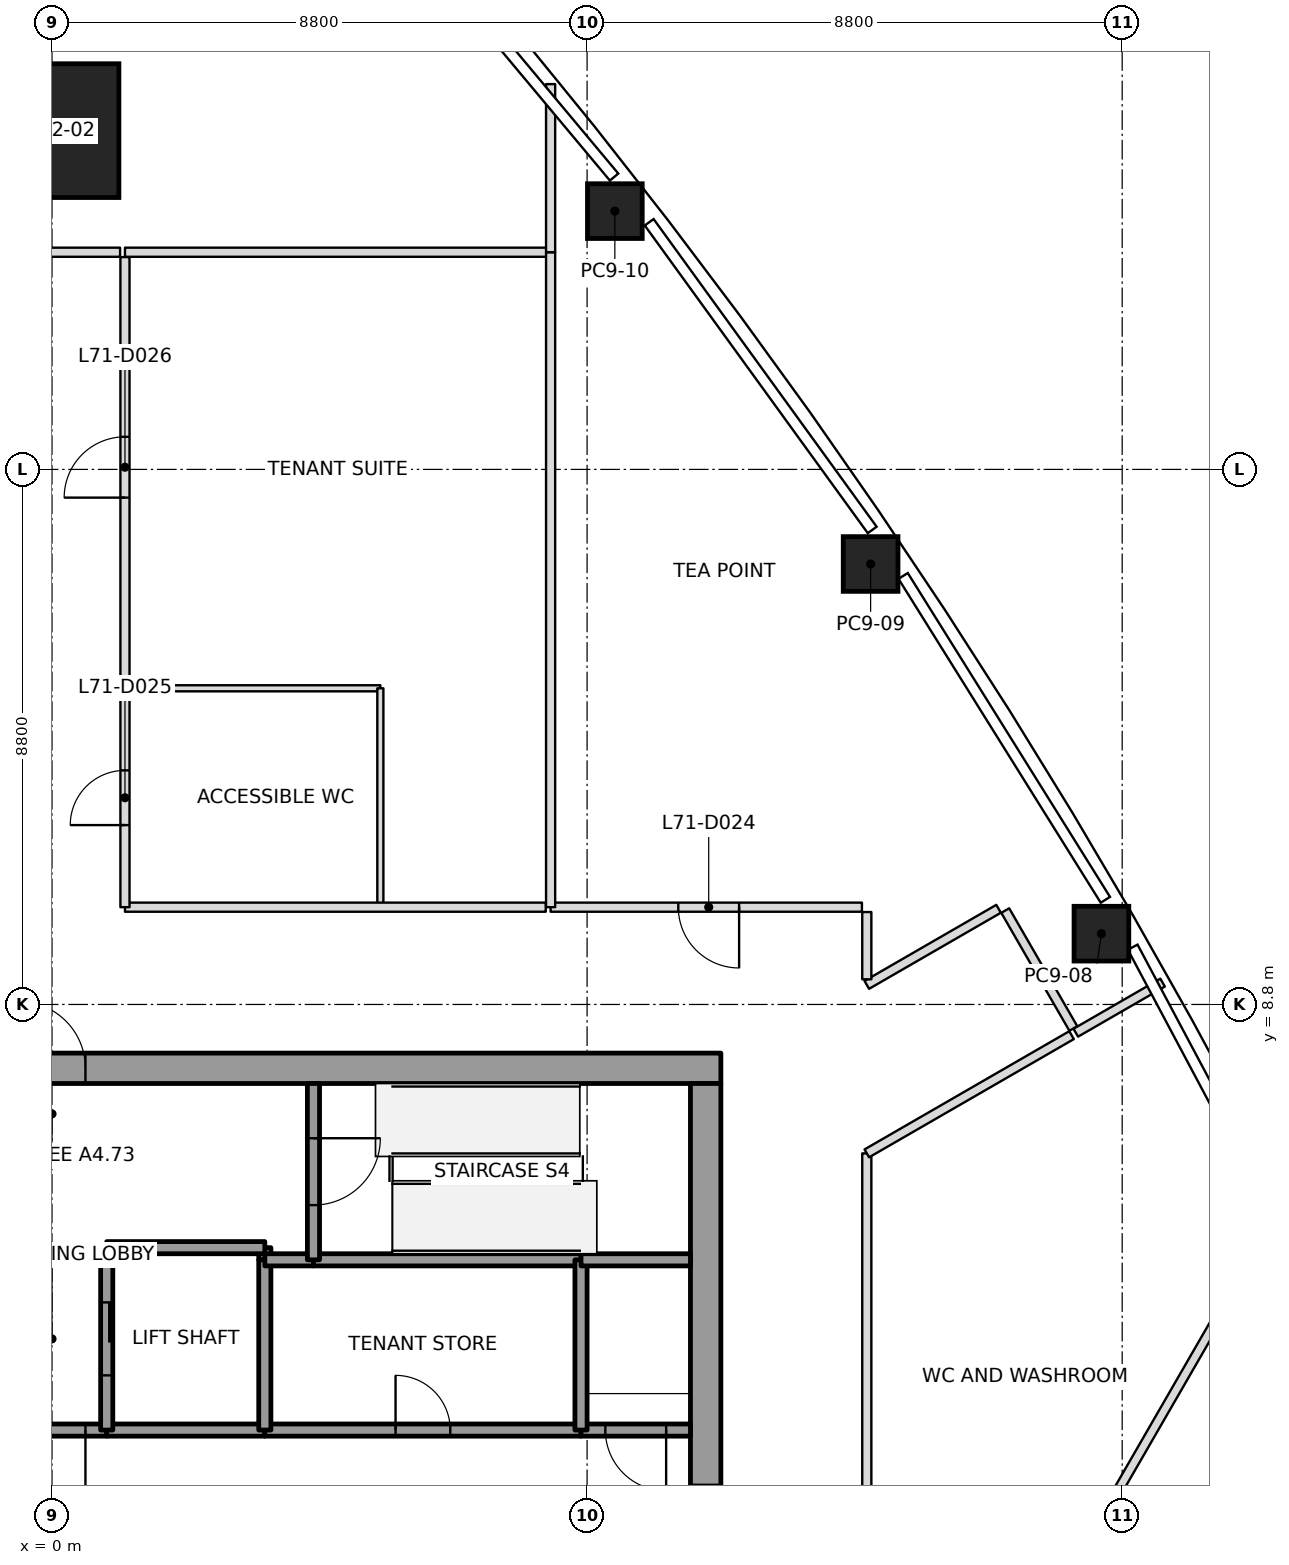
"""IFC4 building model, lengths in metres.
Left out: names, types, materials, properties, quantities, classifications, styles, units other than length and angle.
Written with IfcOpenShell. Run it as: python <this file> out.ifc"""

import sys

from ifc_helpers import new_model, si_unit, direction, frame, frame_2d, origin, origin_2d, place, context, subcontext, project, spatial, rectangle, extrude, element, fill, save


model = new_model("IFC4")
c1 = context("Model", 3, precision=1e-05, world=origin(), true_north=direction((0.0, 1.0)))
c2 = subcontext(c1, "Body", "Model", "MODEL_VIEW")
j1 = project(units=[si_unit("LENGTHUNIT", "METRE"), si_unit("PLANEANGLEUNIT", "RADIAN")], contexts=[c1])
p1 = place(None, origin())
s1 = spatial("IfcSite", under=j1, at=p1, CompositionType="ELEMENT")
p2 = place(p1, origin())
s2 = spatial("IfcBuilding", under=s1, at=p2, CompositionType="ELEMENT")
p3 = place(p2, frame((0.0, 0.0, 311.0)))
s3 = spatial("IfcBuildingStorey", under=s2, at=p3, CompositionType="ELEMENT", Elevation=311.0)
p4 = place(p3, frame((0.0, 23.172, 0.0), z_axis=(0.0, -0.031966077398, 0.999488954364), x_axis=(1.0, 0.0, 0.0)))
e1 = element("IfcColumn", 1, at=p4, inside=s3, PredefinedType="COLUMN", context=c2, shape_type="SweptSolid", body=[
    extrude(rectangle(XDim=2.2, YDim=2.2, at=origin_2d()), origin(), (0.0, 0.0, 1.0), 4.002),
])
p5 = place(p3, frame((17.259, 9.964, 0.0), z_axis=(-0.009887049298, -0.00573692984, 0.999934664812), x_axis=(-0.499975560967, 0.866039512843, 2.5126546e-05)))
e2 = element("IfcColumn", 2, at=p5, inside=s3, PredefinedType="COLUMN", context=c2, shape_type="SweptSolid", body=[
    extrude(rectangle(XDim=0.9, YDim=0.9, at=origin_2d()), origin(), (0.0, 0.0, 1.0), 4.0),
])
p6 = place(p3, frame((13.463, 16.044, 0.0), z_axis=(-0.00530952661, -0.013121243922, 0.999899815924), x_axis=(-0.558539524226, 0.829440110709, 0.007918498852)))
e3 = element("IfcColumn", 3, at=p6, inside=s3, PredefinedType="COLUMN", context=c2, shape_type="SweptSolid", body=[
    extrude(rectangle(XDim=0.9, YDim=0.9, at=origin_2d()), origin(), (0.0, 0.0, 1.0), 4.0),
])
p7 = place(p3, frame((9.256, 21.848, 0.0), z_axis=(-0.000244090509, -0.020259512254, 0.999794725223), x_axis=(-0.614435286735, 0.788808315302, 0.015834144259)))
e4 = element("IfcColumn", 4, at=p7, inside=s3, PredefinedType="COLUMN", context=c2, shape_type="SweptSolid", body=[
    extrude(rectangle(XDim=0.9, YDim=0.9, at=origin_2d()), origin(), (0.0, 0.0, 1.0), 4.001),
])
p8 = place(p3, frame((-11.0, 7.75, 0.0), z_axis=(0.0, 0.0, 1.0), x_axis=(1.0, 0.0, 0.0)))
e5 = element("IfcWall", 5, at=p8, inside=s3, PredefinedType="SHEAR", context=c2, shape_type="SweptSolid", body=[
    extrude(rectangle(XDim=22.0, YDim=0.5, at=frame_2d((11.0, 0.0))), origin(), (0.0, 0.0, 1.0), 4.0),
])
p9 = place(p8, frame((10.45, 0.0, 0.0)))
e6 = element("IfcOpeningElement", 6, at=p9, cuts=e5, PredefinedType="OPENING", context=c2, shape_type="SweptSolid", body=[
    extrude(rectangle(XDim=1.1, YDim=2.1, at=frame_2d((0.55, 1.05))), frame((0.0, 0.25, 0.0), z_axis=(0.0, -1.0, 0.0), x_axis=(1.0, 0.0, 0.0)), (0.0, 0.0, 1.0), 0.5),
])
p10 = place(p3, frame((10.75, -7.5, 0.0), z_axis=(0.0, 0.0, 1.0), x_axis=(0.0, 1.0, 0.0)))
e7 = element("IfcWall", 7, at=p10, inside=s3, PredefinedType="SHEAR", context=c2, shape_type="SweptSolid", body=[
    extrude(rectangle(XDim=15.0, YDim=0.5, at=frame_2d((7.5, 0.0))), origin(), (0.0, 0.0, 1.0), 4.0),
])
p11 = place(p10, frame((6.6, 0.0, 0.0)))
e8 = element("IfcOpeningElement", 8, at=p11, cuts=e7, PredefinedType="OPENING", context=c2, shape_type="SweptSolid", body=[
    extrude(rectangle(XDim=1.8, YDim=2.1, at=frame_2d((0.9, 1.05))), frame((0.0, 0.25, 0.0), z_axis=(0.0, -1.0, 0.0), x_axis=(1.0, 0.0, 0.0)), (0.0, 0.0, 1.0), 0.5),
])
p12 = place(p3, frame((0.9, 1.8, 0.0), z_axis=(0.0, 0.0, 1.0), x_axis=(-1.0, 0.0, 0.0)))
e9 = element("IfcWall", 9, at=p12, inside=s3, PredefinedType="SOLIDWALL", context=c2, shape_type="SweptSolid", body=[
    extrude(rectangle(XDim=1.8, YDim=0.2, at=frame_2d((0.9, 0.0))), origin(), (0.0, 0.0, 1.0), 3.85),
])
p13 = place(p12, frame((0.35, 0.0, 0.0)))
e10 = element("IfcOpeningElement", 10, at=p13, cuts=e9, PredefinedType="OPENING", context=c2, shape_type="SweptSolid", body=[
    extrude(rectangle(XDim=1.1, YDim=2.1, at=frame_2d((0.55, 1.05))), frame((0.0, 0.1, 0.0), z_axis=(0.0, -1.0, 0.0), x_axis=(1.0, 0.0, 0.0)), (0.0, 0.0, 1.0), 0.2),
])
p14 = place(p3, frame((3.5, 1.8, 0.0), z_axis=(0.0, 0.0, 1.0), x_axis=(-1.0, 0.0, 0.0)))
e11 = element("IfcWall", 11, at=p14, inside=s3, PredefinedType="SOLIDWALL", context=c2, shape_type="SweptSolid", body=[
    extrude(rectangle(XDim=2.6, YDim=0.2, at=frame_2d((1.3, 0.0))), origin(), (0.0, 0.0, 1.0), 3.85),
])
p15 = place(p3, frame((3.5, 4.6, 0.0), z_axis=(0.0, 0.0, 1.0), x_axis=(0.0, 1.0, 0.0)))
e12 = element("IfcWall", 12, at=p15, inside=s3, PredefinedType="SOLIDWALL", context=c2, shape_type="SweptSolid", body=[
    extrude(rectangle(XDim=0.2, YDim=0.2, at=frame_2d((0.1, 0.0))), origin(), (0.0, 0.0, 1.0), 3.85),
])
p16 = place(p3, frame((3.5, 4.8, 0.0), z_axis=(0.0, 0.0, 1.0), x_axis=(-1.0, 0.0, 0.0)))
e13 = element("IfcWall", 13, at=p16, inside=s3, PredefinedType="SOLIDWALL", context=c2, shape_type="SweptSolid", body=[
    extrude(rectangle(XDim=2.6, YDim=0.2, at=frame_2d((1.3, 0.0))), origin(), (0.0, 0.0, 1.0), 3.85),
])
p17 = place(p3, frame((0.9, 4.8, 0.0), z_axis=(0.0, 0.0, 1.0), x_axis=(0.0, -1.0, 0.0)))
e14 = element("IfcWall", 14, at=p17, inside=s3, PredefinedType="SOLIDWALL", context=c2, shape_type="SweptSolid", body=[
    extrude(rectangle(XDim=3.0, YDim=0.2, at=frame_2d((1.5, 0.0))), origin(), (0.0, 0.0, 1.0), 3.85),
])
p18 = place(p17, frame((0.9, 0.0, 0.0)))
e15 = element("IfcOpeningElement", 15, at=p18, cuts=e14, PredefinedType="OPENING", context=c2, shape_type="SweptSolid", body=[
    extrude(rectangle(XDim=1.2, YDim=2.1, at=frame_2d((0.6, 1.05))), frame((0.0, 0.1, 0.0), z_axis=(0.0, -1.0, 0.0), x_axis=(1.0, 0.0, 0.0)), (0.0, 0.0, 1.0), 0.2),
])
p19 = place(p3, frame((3.5, 1.8, 0.0), z_axis=(0.0, 0.0, 1.0), x_axis=(1.0, 0.0, 0.0)))
e16 = element("IfcWall", 16, at=p19, inside=s3, PredefinedType="SOLIDWALL", context=c2, shape_type="SweptSolid", body=[
    extrude(rectangle(XDim=5.2, YDim=0.2, at=frame_2d((2.6, 0.0))), origin(), (0.0, 0.0, 1.0), 3.85),
])
p20 = place(p19, frame((2.15, 0.0, 0.0)))
e17 = element("IfcOpeningElement", 17, at=p20, cuts=e16, PredefinedType="OPENING", context=c2, shape_type="SweptSolid", body=[
    extrude(rectangle(XDim=0.9, YDim=2.1, at=frame_2d((0.45, 1.05))), frame((0.0, 0.1, 0.0), z_axis=(0.0, -1.0, 0.0), x_axis=(1.0, 0.0, 0.0)), (0.0, 0.0, 1.0), 0.2),
])
p21 = place(p3, frame((3.5, 4.6, 0.0), z_axis=(0.0, 0.0, 1.0), x_axis=(0.0, -1.0, 0.0)))
e18 = element("IfcWall", 18, at=p21, inside=s3, PredefinedType="SOLIDWALL", context=c2, shape_type="SweptSolid", body=[
    extrude(rectangle(XDim=2.8, YDim=0.2, at=frame_2d((1.4, 0.0))), origin(), (0.0, 0.0, 1.0), 3.85),
])
p22 = place(p3, frame((4.3, 4.6, 0.0), z_axis=(0.0, 0.0, 1.0), x_axis=(-1.0, 0.0, 0.0)))
e19 = element("IfcWall", 19, at=p22, inside=s3, PredefinedType="SOLIDWALL", context=c2, shape_type="SweptSolid", body=[
    extrude(rectangle(XDim=0.8, YDim=0.2, at=frame_2d((0.4, 0.0))), origin(), (0.0, 0.0, 1.0), 3.85),
])
p23 = place(p3, frame((8.7, 4.6, 0.0), z_axis=(0.0, 0.0, 1.0), x_axis=(-1.0, 0.0, 0.0)))
e20 = element("IfcWall", 20, at=p23, inside=s3, PredefinedType="SOLIDWALL", context=c2, shape_type="SweptSolid", body=[
    extrude(rectangle(XDim=4.4, YDim=0.2, at=frame_2d((2.2, 0.0))), origin(), (0.0, 0.0, 1.0), 3.85),
])
p24 = place(p3, frame((4.3, 7.5, 0.0), z_axis=(0.0, 0.0, 1.0), x_axis=(0.0, -1.0, 0.0)))
e21 = element("IfcWall", 21, at=p24, inside=s3, PredefinedType="SOLIDWALL", context=c2, shape_type="SweptSolid", body=[
    extrude(rectangle(XDim=2.9, YDim=0.2, at=frame_2d((1.45, 0.0))), origin(), (0.0, 0.0, 1.0), 3.85),
])
p25 = place(p24, frame((0.9, 0.0, 0.0)))
e22 = element("IfcOpeningElement", 22, at=p25, cuts=e21, PredefinedType="OPENING", context=c2, shape_type="SweptSolid", body=[
    extrude(rectangle(XDim=1.1, YDim=2.1, at=frame_2d((0.55, 1.05))), frame((0.0, 0.1, 0.0), z_axis=(0.0, -1.0, 0.0), x_axis=(1.0, 0.0, 0.0)), (0.0, 0.0, 1.0), 0.2),
])
p26 = place(p3, frame((10.5, 1.8, 0.0), z_axis=(0.0, 0.0, 1.0), x_axis=(-1.0, 0.0, 0.0)))
e23 = element("IfcWall", 23, at=p26, inside=s3, PredefinedType="SOLIDWALL", context=c2, shape_type="SweptSolid", body=[
    extrude(rectangle(XDim=1.8, YDim=0.2, at=frame_2d((0.9, 0.0))), origin(), (0.0, 0.0, 1.0), 3.85),
])
p27 = place(p26, frame((0.4, 0.0, 0.0)))
e24 = element("IfcOpeningElement", 24, at=p27, cuts=e23, PredefinedType="OPENING", context=c2, shape_type="SweptSolid", body=[
    extrude(rectangle(XDim=1.0, YDim=2.1, at=frame_2d((0.5, 1.05))), frame((0.0, 0.1, 0.0), z_axis=(0.0, -1.0, 0.0), x_axis=(1.0, 0.0, 0.0)), (0.0, 0.0, 1.0), 0.2),
])
p28 = place(p3, frame((8.7, 1.8, 0.0), z_axis=(0.0, 0.0, 1.0), x_axis=(0.0, 1.0, 0.0)))
e25 = element("IfcWall", 25, at=p28, inside=s3, PredefinedType="SOLIDWALL", context=c2, shape_type="SweptSolid", body=[
    extrude(rectangle(XDim=2.8, YDim=0.2, at=frame_2d((1.4, 0.0))), origin(), (0.0, 0.0, 1.0), 3.85),
])
p29 = place(p3, frame((10.5, 4.6, 0.0), z_axis=(0.0, 0.0, 1.0), x_axis=(-1.0, 0.0, 0.0)))
e26 = element("IfcWall", 26, at=p29, inside=s3, PredefinedType="SOLIDWALL", context=c2, shape_type="SweptSolid", body=[
    extrude(rectangle(XDim=1.8, YDim=0.2, at=frame_2d((0.9, 0.0))), origin(), (0.0, 0.0, 1.0), 3.85),
])
p30 = place(p3, frame((1.2, 21.172, 0.0), z_axis=(0.0, 0.0, 1.0), x_axis=(1.0, 0.0, 0.0)))
e27 = element("IfcWall", 27, at=p30, inside=s3, PredefinedType="PARTITIONING", context=c2, shape_type="SweptSolid", body=[
    extrude(rectangle(XDim=7.0, YDim=0.15, at=frame_2d((3.5, 0.0))), origin(), (0.0, 0.0, 1.0), 3.443),
])
p31 = place(p3, frame((8.2, 10.4, 0.0), z_axis=(0.0, 0.0, 1.0), x_axis=(0.0, 1.0, 0.0)))
e28 = element("IfcWall", 28, at=p31, inside=s3, PredefinedType="PARTITIONING", context=c2, shape_type="SweptSolid", body=[
    extrude(rectangle(XDim=10.772, YDim=0.15, at=frame_2d((5.386, 0.0))), origin(), (0.0, 0.0, 1.0), 3.317),
])
p32 = place(p3, frame((8.2, 21.172, 0.0), z_axis=(0.0, 0.0, 1.0), x_axis=(0.0, 1.0, 0.0)))
e29 = element("IfcWall", 29, at=p32, inside=s3, PredefinedType="PARTITIONING", context=c2, shape_type="SweptSolid", body=[
    extrude(rectangle(XDim=2.765, YDim=0.15, at=frame_2d((1.383, 0.0))), origin(), (0.0, 0.0, 1.0), 3.234),
])
p33 = place(p3, frame((13.4, -6.351, 0.0), z_axis=(0.0, 0.0, 1.0), x_axis=(0.500000234396, 0.866025268456, 0.0)))
e30 = element("IfcWall", 30, at=p33, inside=s3, PredefinedType="PARTITIONING", context=c2, shape_type="SweptSolid", body=[
    extrude(rectangle(XDim=13.669, YDim=0.15, at=frame_2d((6.834, 0.0))), origin(), (0.0, 0.0, 1.0), 3.234),
])
p34 = place(p3, frame((18.265, 9.159, 0.0), z_axis=(0.0, 0.0, 1.0), x_axis=(-0.866084496772, -0.499897633972, 0.0)))
e31 = element("IfcWall", 31, at=p34, inside=s3, PredefinedType="PARTITIONING", context=c2, shape_type="SweptSolid", body=[
    extrude(rectangle(XDim=1.649, YDim=0.15, at=frame_2d((0.824, 0.0))), origin(), (0.0, 0.0, 1.0), 3.234),
])
p35 = place(p3, frame((1.12, 21.172, 0.0), z_axis=(0.0, 0.0, 1.0), x_axis=(-1.0, 0.0, 0.0)))
e32 = element("IfcWall", 32, at=p35, inside=s3, PredefinedType="PARTITIONING", context=c2, shape_type="SweptSolid", body=[
    extrude(rectangle(XDim=2.24, YDim=0.15, at=frame_2d((1.12, 0.0))), origin(), (0.0, 0.0, 1.0), 3.233),
])
p36 = place(p3, frame((8.12, 10.4, 0.0), z_axis=(0.0, 0.0, 1.0), x_axis=(-1.0, 0.0, 0.0)))
e33 = element("IfcWall", 33, at=p36, inside=s3, PredefinedType="PARTITIONING", context=c2, shape_type="SweptSolid", body=[
    extrude(rectangle(XDim=6.92, YDim=0.15, at=frame_2d((3.46, 0.0))), origin(), (0.0, 0.0, 1.0), 3.45),
])
p37 = place(p3, frame((1.2, 10.4, 0.0), z_axis=(0.0, 0.0, 1.0), x_axis=(0.0, 1.0, 0.0)))
e34 = element("IfcWall", 34, at=p37, inside=s3, PredefinedType="PARTITIONING", context=c2, shape_type="SweptSolid", body=[
    extrude(rectangle(XDim=10.692, YDim=0.15, at=frame_2d((5.346, 0.0))), origin(), (0.0, 0.0, 1.0), 3.317),
])
p38 = place(p37, frame((1.35, 0.0, 0.0)))
e35 = element("IfcOpeningElement", 35, at=p38, cuts=e34, PredefinedType="OPENING", context=c2, shape_type="SweptSolid", body=[
    extrude(rectangle(XDim=0.9, YDim=2.1, at=frame_2d((0.45, 1.05))), frame((0.0, 0.075, 0.0), z_axis=(0.0, -1.0, 0.0), x_axis=(1.0, 0.0, 0.0)), (0.0, 0.0, 1.0), 0.15),
])
p39 = place(p37, frame((6.736, 0.0, 0.0)))
e36 = element("IfcOpeningElement", 36, at=p39, cuts=e34, PredefinedType="OPENING", context=c2, shape_type="SweptSolid", body=[
    extrude(rectangle(XDim=1.0, YDim=2.1, at=frame_2d((0.5, 1.05))), frame((0.0, 0.075, 0.0), z_axis=(0.0, -1.0, 0.0), x_axis=(1.0, 0.0, 0.0)), (0.0, 0.0, 1.0), 0.15),
])
p40 = place(p3, frame((13.32, 10.4, 0.0), z_axis=(0.0, 0.0, 1.0), x_axis=(-1.0, 0.0, 0.0)))
e37 = element("IfcWall", 37, at=p40, inside=s3, PredefinedType="PARTITIONING", context=c2, shape_type="SweptSolid", body=[
    extrude(rectangle(XDim=5.12, YDim=0.15, at=frame_2d((2.56, 0.0))), origin(), (0.0, 0.0, 1.0), 3.443),
])
p41 = place(p40, frame((2.02, 0.0, 0.0)))
e38 = element("IfcOpeningElement", 38, at=p41, cuts=e37, PredefinedType="OPENING", context=c2, shape_type="SweptSolid", body=[
    extrude(rectangle(XDim=1.0, YDim=2.1, at=frame_2d((0.5, 1.05))), frame((0.0, 0.075, 0.0), z_axis=(0.0, -1.0, 0.0), x_axis=(1.0, 0.0, 0.0)), (0.0, 0.0, 1.0), 0.15),
])
p42 = place(p3, frame((13.4, -6.351, 0.0), z_axis=(0.0, 0.0, 1.0), x_axis=(0.0, 1.0, 0.0)))
e39 = element("IfcWall", 39, at=p42, inside=s3, PredefinedType="PARTITIONING", context=c2, shape_type="SweptSolid", body=[
    extrude(rectangle(XDim=12.702, YDim=0.15, at=frame_2d((6.351, 0.0))), origin(), (0.0, 0.0, 1.0), 3.393),
])
p43 = place(p42, frame((5.851, 0.0, 0.0)))
e40 = element("IfcOpeningElement", 40, at=p43, cuts=e39, PredefinedType="OPENING", context=c2, shape_type="SweptSolid", body=[
    extrude(rectangle(XDim=1.0, YDim=2.1, at=frame_2d((0.5, 1.05))), frame((0.0, 0.075, 0.0), z_axis=(0.0, -1.0, 0.0), x_axis=(1.0, 0.0, 0.0)), (0.0, 0.0, 1.0), 0.15),
])
p44 = place(p3, frame((13.4, 6.351, 0.0), z_axis=(0.0, 0.0, 1.0), x_axis=(0.866024577697, 0.500001430823, 0.0)))
e41 = element("IfcWall", 41, at=p44, inside=s3, PredefinedType="PARTITIONING", context=c2, shape_type="SweptSolid", body=[
    extrude(rectangle(XDim=3.889, YDim=0.15, at=frame_2d((1.944, 0.0))), origin(), (0.0, 0.0, 1.0), 3.45),
])
p45 = place(p3, frame((15.567, 10.374, 0.0), z_axis=(0.0, 0.0, 1.0), x_axis=(-0.866013394656, -0.500020799843, 0.0)))
e42 = element("IfcWall", 42, at=p45, inside=s3, PredefinedType="PARTITIONING", context=c2, shape_type="SweptSolid", body=[
    extrude(rectangle(XDim=2.503, YDim=0.15, at=frame_2d((1.251, 0.0))), origin(), (0.0, 0.0, 1.0), 3.45),
])
p46 = place(p3, frame((13.4, 9.214, 0.0), z_axis=(0.0, 0.0, 1.0), x_axis=(0.0, 1.0, 0.0)))
e43 = element("IfcWall", 43, at=p46, inside=s3, PredefinedType="PARTITIONING", context=c2, shape_type="SweptSolid", body=[
    extrude(rectangle(XDim=1.106, YDim=0.15, at=frame_2d((0.553, 0.0))), origin(), (0.0, 0.0, 1.0), 3.45),
])
p47 = place(p3, frame((16.797, 8.404, 0.0), z_axis=(0.0, 0.0, 1.0), x_axis=(-0.49994888933, 0.866054910533, 0.0)))
e44 = element("IfcWall", 44, at=p47, inside=s3, PredefinedType="PARTITIONING", context=c2, shape_type="SweptSolid", body=[
    extrude(rectangle(XDim=2.24, YDim=0.15, at=frame_2d((1.12, 0.0))), origin(), (0.0, 0.0, 1.0), 3.45),
])
p48 = place(p3, frame((1.23, 14.0, 0.0), z_axis=(0.0, 0.0, 1.0), x_axis=(1.0, 0.0, 0.0)))
e45 = element("IfcWall", 45, at=p48, inside=s3, PredefinedType="PARTITIONING", context=c2, shape_type="SweptSolid", body=[
    extrude(rectangle(XDim=4.17, YDim=0.1, at=frame_2d((2.085, 0.0))), origin(), (0.0, 0.0, 1.0), 3.45),
])
p49 = place(p3, frame((5.4, 14.0, 0.0), z_axis=(0.0, 0.0, 1.0), x_axis=(0.0, -1.0, 0.0)))
e46 = element("IfcWall", 46, at=p49, inside=s3, PredefinedType="PARTITIONING", context=c2, shape_type="SweptSolid", body=[
    extrude(rectangle(XDim=3.57, YDim=0.1, at=frame_2d((1.785, 0.0))), origin(), (0.0, 0.0, 1.0), 3.317),
])
p50 = place(p41, origin())
e47 = element("IfcDoor", 47, at=p50, inside=s3, OperationType="SINGLE_SWING_LEFT", PredefinedType="DOOR", context=c2, shape_type="SweptSolid", body=[
    extrude(rectangle(XDim=1.0, YDim=2.1, at=frame_2d((0.5, 1.05))), frame((0.0, 0.025, 0.0), z_axis=(0.0, -1.0, 0.0), x_axis=(1.0, 0.0, 0.0)), (0.0, 0.0, 1.0), 0.05),
])
fill(e38, e47)
p51 = place(p38, origin())
e48 = element("IfcDoor", 48, at=p51, inside=s3, OperationType="SINGLE_SWING_RIGHT", PredefinedType="DOOR", context=c2, shape_type="SweptSolid", body=[
    extrude(rectangle(XDim=0.9, YDim=2.1, at=frame_2d((0.45, 1.05))), frame((0.0, 0.025, 0.0), z_axis=(0.0, -1.0, 0.0), x_axis=(1.0, 0.0, 0.0)), (0.0, 0.0, 1.0), 0.05),
])
fill(e35, e48)
p52 = place(p39, origin())
e49 = element("IfcDoor", 49, at=p52, inside=s3, OperationType="SINGLE_SWING_LEFT", PredefinedType="DOOR", context=c2, shape_type="SweptSolid", body=[
    extrude(rectangle(XDim=1.0, YDim=2.1, at=frame_2d((0.5, 1.05))), frame((0.0, 0.025, 0.0), z_axis=(0.0, -1.0, 0.0), x_axis=(1.0, 0.0, 0.0)), (0.0, 0.0, 1.0), 0.05),
])
fill(e36, e49)
p53 = place(p18, origin())
e50 = element("IfcDoor", 50, at=p53, inside=s3, OperationType="SLIDING_TO_LEFT", PredefinedType="DOOR", context=c2, shape_type="SweptSolid", body=[
    extrude(rectangle(XDim=1.2, YDim=2.1, at=frame_2d((0.6, 1.05))), frame((0.0, 0.025, 0.0), z_axis=(0.0, -1.0, 0.0), x_axis=(1.0, 0.0, 0.0)), (0.0, 0.0, 1.0), 0.05),
])
fill(e15, e50)
p54 = place(p13, origin())
e51 = element("IfcDoor", 51, at=p54, inside=s3, OperationType="SINGLE_SWING_LEFT", PredefinedType="DOOR", context=c2, shape_type="SweptSolid", body=[
    extrude(rectangle(XDim=1.1, YDim=2.1, at=frame_2d((0.55, 1.05))), frame((0.0, 0.025, 0.0), z_axis=(0.0, -1.0, 0.0), x_axis=(1.0, 0.0, 0.0)), (0.0, 0.0, 1.0), 0.05),
])
fill(e10, e51)
p55 = place(p27, origin())
e52 = element("IfcDoor", 52, at=p55, inside=s3, OperationType="SINGLE_SWING_RIGHT", PredefinedType="DOOR", context=c2, shape_type="SweptSolid", body=[
    extrude(rectangle(XDim=1.0, YDim=2.1, at=frame_2d((0.5, 1.05))), frame((0.0, 0.025, 0.0), z_axis=(0.0, -1.0, 0.0), x_axis=(1.0, 0.0, 0.0)), (0.0, 0.0, 1.0), 0.05),
])
fill(e24, e52)
p56 = place(p25, origin())
e53 = element("IfcDoor", 53, at=p56, inside=s3, OperationType="SINGLE_SWING_LEFT", PredefinedType="DOOR", context=c2, shape_type="SweptSolid", body=[
    extrude(rectangle(XDim=1.1, YDim=2.1, at=frame_2d((0.55, 1.05))), frame((0.0, 0.025, 0.0), z_axis=(0.0, -1.0, 0.0), x_axis=(1.0, 0.0, 0.0)), (0.0, 0.0, 1.0), 0.05),
])
fill(e22, e53)
p57 = place(p20, origin())
e54 = element("IfcDoor", 54, at=p57, inside=s3, OperationType="SINGLE_SWING_RIGHT", PredefinedType="DOOR", context=c2, shape_type="SweptSolid", body=[
    extrude(rectangle(XDim=0.9, YDim=2.1, at=frame_2d((0.45, 1.05))), frame((0.0, 0.025, 0.0), z_axis=(0.0, -1.0, 0.0), x_axis=(1.0, 0.0, 0.0)), (0.0, 0.0, 1.0), 0.05),
])
fill(e17, e54)
p58 = place(p11, origin())
e55 = element("IfcDoor", 55, at=p58, inside=s3, OperationType="DOUBLE_DOOR_SINGLE_SWING", PredefinedType="DOOR", context=c2, shape_type="SweptSolid", body=[
    extrude(rectangle(XDim=1.8, YDim=2.1, at=frame_2d((0.9, 1.05))), frame((0.0, 0.025, 0.0), z_axis=(0.0, -1.0, 0.0), x_axis=(1.0, 0.0, 0.0)), (0.0, 0.0, 1.0), 0.05),
])
fill(e8, e55)
p59 = place(p9, origin())
e56 = element("IfcDoor", 56, at=p59, inside=s3, OperationType="SINGLE_SWING_LEFT", PredefinedType="DOOR", context=c2, shape_type="SweptSolid", body=[
    extrude(rectangle(XDim=1.1, YDim=2.1, at=frame_2d((0.55, 1.05))), frame((0.0, 0.025, 0.0), z_axis=(0.0, -1.0, 0.0), x_axis=(1.0, 0.0, 0.0)), (0.0, 0.0, 1.0), 0.05),
])
fill(e6, e56)
save(model, sys.argv[1])
